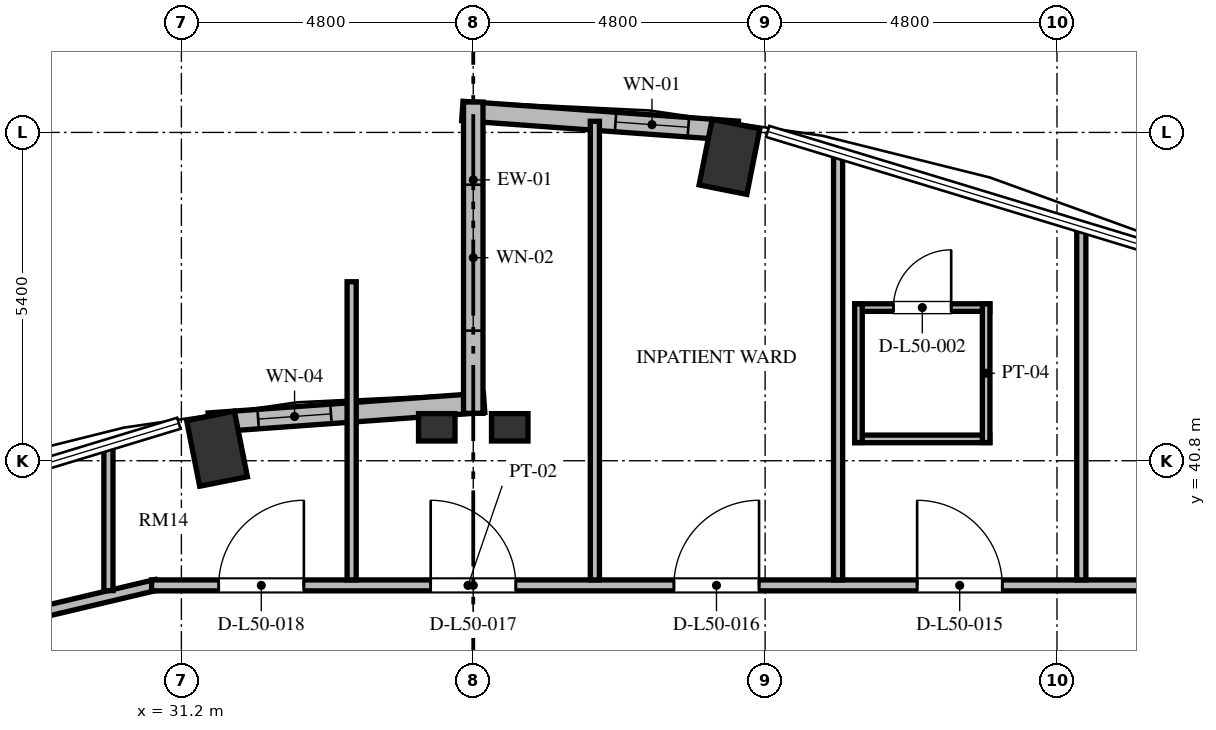
"""IFC4 building model, lengths in metres.
Left out: names, types, materials, properties, quantities, classifications, styles, units other than length and angle.
Written with IfcOpenShell. Run it as: python <this file> out.ifc"""

import sys

from ifc_helpers import new_model, si_unit, direction, frame, frame_2d, origin, origin_2d, place, context, subcontext, project, spatial, rectangle, extrude, element, fill, save


model = new_model("IFC4")
c1 = context("Model", 3, precision=1e-05, world=origin(), true_north=direction((0.0, 1.0)))
c2 = subcontext(c1, "Body", "Model", "MODEL_VIEW")
j1 = project(units=[si_unit("LENGTHUNIT", "METRE"), si_unit("PLANEANGLEUNIT", "RADIAN")], contexts=[c1])
p1 = place(None, origin())
s1 = spatial("IfcSite", under=j1, at=p1, CompositionType="ELEMENT")
p2 = place(p1, origin())
s2 = spatial("IfcBuilding", under=s1, at=p2, CompositionType="ELEMENT")
p3 = place(p2, frame((0.0, 0.0, 194.832)))
s3 = spatial("IfcBuildingStorey", under=s2, at=p3, CompositionType="ELEMENT", Elevation=194.832)
for number, where, z_axis, x_axis in (
    (1, (40.214, 45.798, 0.0), (0.0, 0.0, 1.0), (0.195, 0.981, 0.0)),
    (2, (31.786, 40.998, 0.0), (0.0, 0.0, 1.0), (-0.195, 0.981, 0.0)),
):
    element("IfcColumn", number, at=place(p3, frame(where, z_axis=z_axis, x_axis=x_axis)), inside=s3, PredefinedType="COLUMN", context=c2, shape_type="SweptSolid", body=[
        extrude(rectangle(XDim=1.1, YDim=0.8, at=origin_2d()), origin(), (0.0, 0.0, 1.0), 3.648),
    ])
for number, where, z_axis, x_axis in (
    (3, (35.4, 41.35, 0.0), (0.0, 0.0, 1.0), (1.0, 0.0, 0.0)),
    (4, (36.6, 41.35, 0.0), (0.0, 0.0, 1.0), (1.0, 0.0, 0.0)),
):
    element("IfcColumn", number, at=place(p3, frame(where, z_axis=z_axis, x_axis=x_axis)), inside=s3, PredefinedType="PILASTER", context=c2, shape_type="SweptSolid", body=[
        extrude(rectangle(XDim=0.6, YDim=0.45, at=origin_2d()), origin(), (0.0, 0.0, 1.0), 3.648),
    ])
p4 = place(p3, frame((40.35, 46.226, 0.0), z_axis=(0.0, 0.0, 1.0), x_axis=(-0.997409061056, 0.071938619141, 0.0)))
e5 = element("IfcWall", 5, at=p4, inside=s3, PredefinedType="SOLIDWALL", context=c2, shape_type="SweptSolid", body=[
    extrude(rectangle(XDim=4.541, YDim=0.32, at=frame_2d((2.271, 0.0))), origin(), (0.0, 0.0, 1.0), 3.448),
])
p5 = place(p4, frame((0.815, 0.0, 0.85)))
e6 = element("IfcOpeningElement", 6, at=p5, cuts=e5, PredefinedType="OPENING", context=c2, shape_type="SweptSolid", body=[
    extrude(rectangle(XDim=1.2, YDim=2.2, at=frame_2d((0.6, 1.1))), frame((0.0, 0.17, 0.0), z_axis=(0.0, -1.0, 0.0), x_axis=(1.0, 0.0, 0.0)), (0.0, 0.0, 1.0), 0.34),
])
p6 = place(p3, frame((36.179, 41.753, 0.0), z_axis=(0.0, 0.0, 1.0), x_axis=(-0.997408782787, -0.071942477163, 0.0)))
e7 = element("IfcWall", 7, at=p6, inside=s3, PredefinedType="SOLIDWALL", context=c2, shape_type="SweptSolid", body=[
    extrude(rectangle(XDim=4.541, YDim=0.32, at=frame_2d((2.27, 0.0))), origin(), (0.0, 0.0, 1.0), 3.448),
])
p7 = place(p6, frame((2.526, 0.0, 0.85)))
e8 = element("IfcOpeningElement", 8, at=p7, cuts=e7, PredefinedType="OPENING", context=c2, shape_type="SweptSolid", body=[
    extrude(rectangle(XDim=1.2, YDim=1.8, at=frame_2d((0.6, 0.9))), frame((0.0, 0.17, 0.0), z_axis=(0.0, -1.0, 0.0), x_axis=(1.0, 0.0, 0.0)), (0.0, 0.0, 1.0), 0.34),
])
p8 = place(p3, frame((36.0, 46.7, 0.0), z_axis=(0.0, 0.0, 1.0), x_axis=(0.0, -1.0, 0.0)))
e9 = element("IfcWall", 9, at=p8, inside=s3, PredefinedType="SOLIDWALL", context=c2, shape_type="SweptSolid", body=[
    extrude(rectangle(XDim=5.12, YDim=0.32, at=frame_2d((2.56, 0.0))), origin(), (0.0, 0.0, 1.0), 3.448),
])
p9 = place(p8, frame((1.36, 0.0, 0.84)))
e10 = element("IfcOpeningElement", 10, at=p9, cuts=e9, PredefinedType="OPENING", context=c2, shape_type="SweptSolid", body=[
    extrude(rectangle(XDim=2.4, YDim=2.04, at=frame_2d((1.2, 1.02))), frame((0.0, 0.17, 0.0), z_axis=(0.0, -1.0, 0.0), x_axis=(1.0, 0.0, 0.0)), (0.0, 0.0, 1.0), 0.34),
])
p10 = place(p3, frame((28.476, 38.211, 0.0), z_axis=(0.0, 0.0, 1.0), x_axis=(0.973030562203, 0.230676234189, 0.0)))
e11 = element("IfcWall", 11, at=p10, inside=s3, PredefinedType="PARTITIONING", context=c2, shape_type="SweptSolid", body=[
    extrude(rectangle(XDim=2.377, YDim=0.18, at=frame_2d((1.188, 0.0))), origin(), (0.0, 0.0, 1.0), 3.448),
])
p11 = place(p3, frame((30.71, 38.75, 0.0), z_axis=(0.0, 0.0, 1.0), x_axis=(1.0, 0.0, 0.0)))
e12 = element("IfcWall", 12, at=p11, inside=s3, PredefinedType="PARTITIONING", context=c2, shape_type="SweptSolid", body=[
    extrude(rectangle(XDim=20.815, YDim=0.18, at=frame_2d((10.408, 0.0))), origin(), (0.0, 0.0, 1.0), 3.073),
])
p12 = place(p11, frame((17.194, 0.0, 0.0)))
e13 = element("IfcOpeningElement", 13, at=p12, cuts=e12, PredefinedType="OPENING", context=c2, shape_type="SweptSolid", body=[
    extrude(rectangle(XDim=1.4, YDim=2.2, at=frame_2d((0.7, 1.1))), frame((0.0, 0.1, 0.0), z_axis=(0.0, -1.0, 0.0), x_axis=(1.0, 0.0, 0.0)), (0.0, 0.0, 1.0), 0.2),
])
p13 = place(p11, frame((12.59, 0.0, 0.0)))
e14 = element("IfcOpeningElement", 14, at=p13, cuts=e12, PredefinedType="OPENING", context=c2, shape_type="SweptSolid", body=[
    extrude(rectangle(XDim=1.4, YDim=2.2, at=frame_2d((0.7, 1.1))), frame((0.0, 0.1, 0.0), z_axis=(0.0, -1.0, 0.0), x_axis=(1.0, 0.0, 0.0)), (0.0, 0.0, 1.0), 0.2),
])
p14 = place(p11, frame((8.59, 0.0, 0.0)))
e15 = element("IfcOpeningElement", 15, at=p14, cuts=e12, PredefinedType="OPENING", context=c2, shape_type="SweptSolid", body=[
    extrude(rectangle(XDim=1.4, YDim=2.2, at=frame_2d((0.7, 1.1))), frame((0.0, 0.1, 0.0), z_axis=(0.0, -1.0, 0.0), x_axis=(1.0, 0.0, 0.0)), (0.0, 0.0, 1.0), 0.2),
])
p15 = place(p11, frame((4.59, 0.0, 0.0)))
e16 = element("IfcOpeningElement", 16, at=p15, cuts=e12, PredefinedType="OPENING", context=c2, shape_type="SweptSolid", body=[
    extrude(rectangle(XDim=1.4, YDim=2.2, at=frame_2d((0.7, 1.1))), frame((0.0, 0.1, 0.0), z_axis=(0.0, -1.0, 0.0), x_axis=(1.0, 0.0, 0.0)), (0.0, 0.0, 1.0), 0.2),
])
p16 = place(p11, frame((1.104, 0.0, 0.0)))
e17 = element("IfcOpeningElement", 17, at=p16, cuts=e12, PredefinedType="OPENING", context=c2, shape_type="SweptSolid", body=[
    extrude(rectangle(XDim=1.4, YDim=2.2, at=frame_2d((0.7, 1.1))), frame((0.0, 0.1, 0.0), z_axis=(0.0, -1.0, 0.0), x_axis=(1.0, 0.0, 0.0)), (0.0, 0.0, 1.0), 0.2),
])
p17 = place(p3, frame((30.0, 38.664, 0.0), z_axis=(0.0, 0.0, 1.0), x_axis=(0.0, 1.0, 0.0)))
e18 = element("IfcWall", 18, at=p17, inside=s3, PredefinedType="PARTITIONING", context=c2, shape_type="SweptSolid", body=[
    extrude(rectangle(XDim=2.384, YDim=0.15, at=frame_2d((1.192, 0.0))), origin(), (0.0, 0.0, 1.0), 3.448),
])
p18 = place(p3, frame((34.0, 38.84, 0.0), z_axis=(0.0, 0.0, 1.0), x_axis=(0.0, 1.0, 0.0)))
e19 = element("IfcWall", 19, at=p18, inside=s3, PredefinedType="PARTITIONING", context=c2, shape_type="SweptSolid", body=[
    extrude(rectangle(XDim=4.904, YDim=0.15, at=frame_2d((2.452, 0.0))), origin(), (0.0, 0.0, 1.0), 3.448),
])
p19 = place(p3, frame((38.0, 38.84, 0.0), z_axis=(0.0, 0.0, 1.0), x_axis=(0.0, 1.0, 0.0)))
e20 = element("IfcWall", 20, at=p19, inside=s3, PredefinedType="PARTITIONING", context=c2, shape_type="SweptSolid", body=[
    extrude(rectangle(XDim=7.543, YDim=0.15, at=frame_2d((3.771, 0.0))), origin(), (0.0, 0.0, 1.0), 3.448),
])
p20 = place(p3, frame((42.0, 38.84, 0.0), z_axis=(0.0, 0.0, 1.0), x_axis=(0.0, 1.0, 0.0)))
e21 = element("IfcWall", 21, at=p20, inside=s3, PredefinedType="PARTITIONING", context=c2, shape_type="SweptSolid", body=[
    extrude(rectangle(XDim=7.008, YDim=0.15, at=frame_2d((3.504, 0.0))), origin(), (0.0, 0.0, 1.0), 3.448),
])
p21 = place(p3, frame((46.0, 38.84, 0.0), z_axis=(0.0, 0.0, 1.0), x_axis=(0.0, 1.0, 0.0)))
e22 = element("IfcWall", 22, at=p21, inside=s3, PredefinedType="PARTITIONING", context=c2, shape_type="SweptSolid", body=[
    extrude(rectangle(XDim=5.793, YDim=0.15, at=frame_2d((2.896, 0.0))), origin(), (0.0, 0.0, 1.0), 3.448),
])
p22 = place(p3, frame((42.275, 43.319, 0.0), z_axis=(0.0, 0.0, 1.0), x_axis=(1.0, 0.0, 0.0)))
e23 = element("IfcWall", 23, at=p22, inside=s3, PredefinedType="PARTITIONING", context=c2, shape_type="SweptSolid", body=[
    extrude(rectangle(XDim=2.22, YDim=0.125, at=frame_2d((1.11, 0.0))), origin(), (0.0, 0.0, 1.0), 3.448),
])
p23 = place(p22, frame((0.635, 0.0, 0.0)))
e24 = element("IfcOpeningElement", 24, at=p23, cuts=e23, PredefinedType="OPENING", context=c2, shape_type="SweptSolid", body=[
    extrude(rectangle(XDim=0.95, YDim=2.1, at=frame_2d((0.475, 1.05))), frame((0.0, 0.073, 0.0), z_axis=(0.0, -1.0, 0.0), x_axis=(1.0, 0.0, 0.0)), (0.0, 0.0, 1.0), 0.145),
])
p24 = place(p3, frame((42.275, 41.159, 0.0), z_axis=(0.0, 0.0, 1.0), x_axis=(1.0, 0.0, 0.0)))
e25 = element("IfcWall", 25, at=p24, inside=s3, PredefinedType="PARTITIONING", context=c2, shape_type="SweptSolid", body=[
    extrude(rectangle(XDim=2.22, YDim=0.125, at=frame_2d((1.11, 0.0))), origin(), (0.0, 0.0, 1.0), 3.073),
])
for number, where, z_axis, x_axis in (
    (26, (44.435, 41.099, 0.0), (0.0, 0.0, 1.0), (0.0, 1.0, 0.0)),
    (27, (42.335, 41.099, 0.0), (0.0, 0.0, 1.0), (0.0, 1.0, 0.0)),
):
    element("IfcWall", number, at=place(p3, frame(where, z_axis=z_axis, x_axis=x_axis)), inside=s3, PredefinedType="PARTITIONING", context=c2, shape_type="SweptSolid", body=[
        extrude(rectangle(XDim=2.28, YDim=0.125, at=frame_2d((1.14, 0.0))), origin(), (0.0, 0.0, 1.0), 3.448),
    ])
p25 = place(p5, origin())
e28 = element("IfcWindow", 28, at=p25, inside=s3, PartitioningType="SINGLE_PANEL", PredefinedType="WINDOW", context=c2, shape_type="SweptSolid", body=[
    extrude(rectangle(XDim=1.2, YDim=2.2, at=frame_2d((0.6, 1.1))), frame((0.0, 0.03, 0.0), z_axis=(0.0, -1.0, 0.0), x_axis=(1.0, 0.0, 0.0)), (0.0, 0.0, 1.0), 0.06),
])
fill(e6, e28)
p26 = place(p7, origin())
e29 = element("IfcWindow", 29, at=p26, inside=s3, PartitioningType="SINGLE_PANEL", PredefinedType="WINDOW", context=c2, shape_type="SweptSolid", body=[
    extrude(rectangle(XDim=1.2, YDim=1.8, at=frame_2d((0.6, 0.9))), frame((0.0, 0.03, 0.0), z_axis=(0.0, -1.0, 0.0), x_axis=(1.0, 0.0, 0.0)), (0.0, 0.0, 1.0), 0.06),
])
fill(e8, e29)
p27 = place(p9, origin())
e30 = element("IfcWindow", 30, at=p27, inside=s3, PartitioningType="SINGLE_PANEL", PredefinedType="WINDOW", context=c2, shape_type="SweptSolid", body=[
    extrude(rectangle(XDim=2.4, YDim=2.04, at=frame_2d((1.2, 1.02))), frame((0.0, 0.03, 0.0), z_axis=(0.0, -1.0, 0.0), x_axis=(1.0, 0.0, 0.0)), (0.0, 0.0, 1.0), 0.06),
])
fill(e10, e30)
p28 = place(p23, origin())
e31 = element("IfcDoor", 31, at=p28, inside=s3, OperationType="SINGLE_SWING_RIGHT", PredefinedType="DOOR", context=c2, shape_type="SweptSolid", body=[
    extrude(rectangle(XDim=0.95, YDim=2.1, at=frame_2d((0.475, 1.05))), frame((0.0, 0.025, 0.0), z_axis=(0.0, -1.0, 0.0), x_axis=(1.0, 0.0, 0.0)), (0.0, 0.0, 1.0), 0.05),
])
fill(e24, e31)
p29 = place(p13, origin())
e32 = element("IfcDoor", 32, at=p29, inside=s3, OperationType="SINGLE_SWING_LEFT", PredefinedType="DOOR", context=c2, shape_type="SweptSolid", body=[
    extrude(rectangle(XDim=1.4, YDim=2.2, at=frame_2d((0.7, 1.1))), frame((0.0, 0.025, 0.0), z_axis=(0.0, -1.0, 0.0), x_axis=(1.0, 0.0, 0.0)), (0.0, 0.0, 1.0), 0.05),
])
fill(e14, e32)
p30 = place(p14, origin())
e33 = element("IfcDoor", 33, at=p30, inside=s3, OperationType="SINGLE_SWING_RIGHT", PredefinedType="DOOR", context=c2, shape_type="SweptSolid", body=[
    extrude(rectangle(XDim=1.4, YDim=2.2, at=frame_2d((0.7, 1.1))), frame((0.0, 0.025, 0.0), z_axis=(0.0, -1.0, 0.0), x_axis=(1.0, 0.0, 0.0)), (0.0, 0.0, 1.0), 0.05),
])
fill(e15, e33)
p31 = place(p15, origin())
e34 = element("IfcDoor", 34, at=p31, inside=s3, OperationType="SINGLE_SWING_LEFT", PredefinedType="DOOR", context=c2, shape_type="SweptSolid", body=[
    extrude(rectangle(XDim=1.4, YDim=2.2, at=frame_2d((0.7, 1.1))), frame((0.0, 0.025, 0.0), z_axis=(0.0, -1.0, 0.0), x_axis=(1.0, 0.0, 0.0)), (0.0, 0.0, 1.0), 0.05),
])
fill(e16, e34)
p32 = place(p16, origin())
e35 = element("IfcDoor", 35, at=p32, inside=s3, OperationType="SINGLE_SWING_RIGHT", PredefinedType="DOOR", context=c2, shape_type="SweptSolid", body=[
    extrude(rectangle(XDim=1.4, YDim=2.2, at=frame_2d((0.7, 1.1))), frame((0.0, 0.025, 0.0), z_axis=(0.0, -1.0, 0.0), x_axis=(1.0, 0.0, 0.0)), (0.0, 0.0, 1.0), 0.05),
])
fill(e17, e35)
save(model, sys.argv[1])
